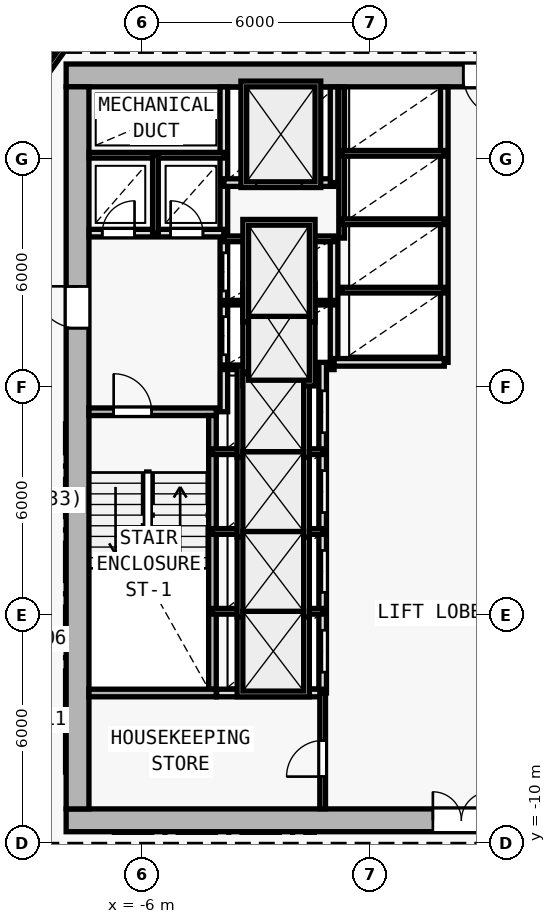
"""IFC4 building model, lengths in metres.
Left out: names, types, materials, properties, quantities, classifications, styles, units other than length and angle.
Written with IfcOpenShell. Run it as: python <this file> out.ifc"""

import sys

from ifc_helpers import new_model, si_unit, direction, frame, frame_2d, origin, origin_2d, place, context, subcontext, project, spatial, rectangle, i_section, extrude, element, fill, save


model = new_model("IFC4")
c1 = context("Model", 3, precision=1e-05, world=origin(), true_north=direction((0.0, 1.0)))
c2 = subcontext(c1, "Body", "Model", "MODEL_VIEW")
j1 = project(units=[si_unit("LENGTHUNIT", "METRE"), si_unit("PLANEANGLEUNIT", "RADIAN")], contexts=[c1])
p1 = place(None, origin())
s1 = spatial("IfcSite", under=j1, at=p1, CompositionType="ELEMENT")
p2 = place(p1, origin())
s2 = spatial("IfcBuilding", under=s1, at=p2, CompositionType="ELEMENT")
p3 = place(p2, frame((0.0, 0.0, 122.1)))
s3 = spatial("IfcBuildingStorey", under=s2, at=p3, CompositionType="ELEMENT", Elevation=122.1)
for number, where, z_axis, x_axis in (
    (1, (-7.7, -9.4, 0.0), (0.0, 0.0, 1.0), (1.0, 0.0, 0.0)),
    (2, (-7.7, 10.2, 0.0), (0.0, 0.0, 1.0), (1.0, 0.0, 0.0)),
    (3, (0.0, -9.4, 0.0), (0.0, 0.0, 1.0), (1.0, 0.0, 0.0)),
    (4, (-7.7, 2.0, 0.0), (0.0, 0.0, 1.0), (1.0, 0.0, 0.0)),
):
    element("IfcColumn", number, at=place(p3, frame(where, z_axis=z_axis, x_axis=x_axis)), inside=s3, PredefinedType="COLUMN", context=c2, shape_type="SweptSolid", body=[
        extrude(i_section(OverallWidth=0.409, OverallDepth=0.425, WebThickness=0.021, FlangeThickness=0.034, FilletRadius=0.015, at=origin_2d()), origin(), (0.0, 0.0, 1.0), 3.6),
    ])
p4 = place(p3, frame((-8.0, -9.4, 0.0), z_axis=(0.0, 0.0, 1.0), x_axis=(1.0, 0.0, 0.0)))
e5 = element("IfcWall", 5, at=p4, inside=s3, PredefinedType="SHEAR", context=c2, shape_type="SweptSolid", body=[
    extrude(rectangle(XDim=16.0, YDim=0.6, at=frame_2d((8.0, 0.0))), origin(), (0.0, 0.0, 1.0), 3.35),
])
p5 = place(p4, frame((9.65, 0.0, 0.0)))
e6 = element("IfcOpeningElement", 6, at=p5, cuts=e5, PredefinedType="OPENING", context=c2, shape_type="SweptSolid", body=[
    extrude(rectangle(XDim=1.5, YDim=2.2, at=frame_2d((0.75, 1.1))), frame((0.0, 0.31, 0.0), z_axis=(0.0, -1.0, 0.0), x_axis=(1.0, 0.0, 0.0)), (0.0, 0.0, 1.0), 0.62),
])
p6 = place(p3, frame((8.0, 10.2, 0.0), z_axis=(0.0, 0.0, 1.0), x_axis=(-1.0, 0.0, 0.0)))
e7 = element("IfcWall", 7, at=p6, inside=s3, PredefinedType="SHEAR", context=c2, shape_type="SweptSolid", body=[
    extrude(rectangle(XDim=16.0, YDim=0.6, at=frame_2d((8.0, 0.0))), origin(), (0.0, 0.0, 1.0), 3.35),
])
p7 = place(p6, frame((4.45, 0.0, 0.0)))
e8 = element("IfcOpeningElement", 8, at=p7, cuts=e7, PredefinedType="OPENING", context=c2, shape_type="SweptSolid", body=[
    extrude(rectangle(XDim=1.1, YDim=2.15, at=frame_2d((0.55, 1.075))), frame((0.0, 0.31, 0.0), z_axis=(0.0, -1.0, 0.0), x_axis=(1.0, 0.0, 0.0)), (0.0, 0.0, 1.0), 0.62),
])
p8 = place(p3, frame((-7.7, -9.1, 0.0), z_axis=(0.0, 0.0, 1.0), x_axis=(0.0, 1.0, 0.0)))
e9 = element("IfcWall", 9, at=p8, inside=s3, PredefinedType="SHEAR", context=c2, shape_type="SweptSolid", body=[
    extrude(rectangle(XDim=19.0, YDim=0.6, at=frame_2d((9.5, 0.0))), origin(), (0.0, 0.0, 1.0), 3.35),
])
p9 = place(p8, frame((12.65, 0.0, 0.0)))
e10 = element("IfcOpeningElement", 10, at=p9, cuts=e9, PredefinedType="OPENING", context=c2, shape_type="SweptSolid", body=[
    extrude(rectangle(XDim=1.1, YDim=2.15, at=frame_2d((0.55, 1.075))), frame((0.0, 0.31, 0.0), z_axis=(0.0, -1.0, 0.0), x_axis=(1.0, 0.0, 0.0)), (0.0, 0.0, 1.0), 0.62),
])
p10 = place(p3, frame((-7.4, 1.35, 0.0), z_axis=(0.0, 0.0, 1.0), x_axis=(1.0, 0.0, 0.0)))
e11 = element("IfcWall", 11, at=p10, inside=s3, PredefinedType="SOLIDWALL", context=c2, shape_type="SweptSolid", body=[
    extrude(rectangle(XDim=3.35, YDim=0.2, at=frame_2d((1.675, 0.0))), origin(), (0.0, 0.0, 1.0), 3.35),
])
p11 = place(p10, frame((0.65, 0.0, 0.0)))
e12 = element("IfcOpeningElement", 12, at=p11, cuts=e11, PredefinedType="OPENING", context=c2, shape_type="SweptSolid", body=[
    extrude(rectangle(XDim=1.0, YDim=2.15, at=frame_2d((0.5, 1.075))), frame((0.0, 0.11, 0.0), z_axis=(0.0, -1.0, 0.0), x_axis=(1.0, 0.0, 0.0)), (0.0, 0.0, 1.0), 0.22),
])
p12 = place(p3, frame((-4.15, -5.95, 0.0), z_axis=(0.0, 0.0, 1.0), x_axis=(0.0, 1.0, 0.0)))
e13 = element("IfcWall", 13, at=p12, inside=s3, PredefinedType="SOLIDWALL", context=c2, shape_type="SweptSolid", body=[
    extrude(rectangle(XDim=7.2, YDim=0.2, at=frame_2d((3.6, 0.0))), origin(), (0.0, 0.0, 1.0), 3.35),
])
p13 = place(p3, frame((-3.85, 1.35, 0.0), z_axis=(0.0, 0.0, 1.0), x_axis=(0.0, 1.0, 0.0)))
e14 = element("IfcWall", 14, at=p13, inside=s3, PredefinedType="SOLIDWALL", context=c2, shape_type="SweptSolid", body=[
    extrude(rectangle(XDim=8.545, YDim=0.2, at=frame_2d((4.272, 0.0))), origin(), (0.0, 0.0, 1.0), 3.35),
])
p14 = place(p13, frame((1.5, 0.0, 0.0)))
e15 = element("IfcOpeningElement", 15, at=p14, cuts=e14, PredefinedType="OPENING", context=c2, shape_type="SweptSolid", body=[
    extrude(rectangle(XDim=1.0, YDim=2.15, at=frame_2d((0.5, 1.075))), frame((0.0, 0.11, 0.0), z_axis=(0.0, -1.0, 0.0), x_axis=(1.0, 0.0, 0.0)), (0.0, 0.0, 1.0), 0.22),
])
p15 = place(p13, frame((3.18, 0.0, 0.0)))
e16 = element("IfcOpeningElement", 16, at=p15, cuts=e14, PredefinedType="OPENING", context=c2, shape_type="SweptSolid", body=[
    extrude(rectangle(XDim=1.0, YDim=2.15, at=frame_2d((0.5, 1.075))), frame((0.0, 0.11, 0.0), z_axis=(0.0, -1.0, 0.0), x_axis=(1.0, 0.0, 0.0)), (0.0, 0.0, 1.0), 0.22),
])
p16 = place(p3, frame((-7.395, 6.05, 0.0), z_axis=(0.0, 0.0, 1.0), x_axis=(1.0, 0.0, 0.0)))
e17 = element("IfcWall", 17, at=p16, inside=s3, PredefinedType="SOLIDWALL", context=c2, shape_type="SweptSolid", body=[
    extrude(rectangle(XDim=3.545, YDim=0.2, at=frame_2d((1.772, 0.0))), origin(), (0.0, 0.0, 1.0), 3.35),
])
p17 = place(p16, frame((0.345, 0.0, 0.0)))
e18 = element("IfcOpeningElement", 18, at=p17, cuts=e17, PredefinedType="OPENING", context=c2, shape_type="SweptSolid", body=[
    extrude(rectangle(XDim=0.85, YDim=2.1, at=frame_2d((0.425, 1.05))), frame((0.0, 0.11, 0.0), z_axis=(0.0, -1.0, 0.0), x_axis=(1.0, 0.0, 0.0)), (0.0, 0.0, 1.0), 0.22),
])
p18 = place(p16, frame((2.145, 0.0, 0.0)))
e19 = element("IfcOpeningElement", 19, at=p18, cuts=e17, PredefinedType="OPENING", context=c2, shape_type="SweptSolid", body=[
    extrude(rectangle(XDim=0.85, YDim=2.1, at=frame_2d((0.425, 1.05))), frame((0.0, 0.11, 0.0), z_axis=(0.0, -1.0, 0.0), x_axis=(1.0, 0.0, 0.0)), (0.0, 0.0, 1.0), 0.22),
])
p19 = place(p3, frame((-7.395, 8.1, 0.0), z_axis=(0.0, 0.0, 1.0), x_axis=(1.0, 0.0, 0.0)))
e20 = element("IfcWall", 20, at=p19, inside=s3, PredefinedType="PARTITIONING", context=c2, shape_type="SweptSolid", body=[
    extrude(rectangle(XDim=3.545, YDim=0.15, at=frame_2d((1.772, 0.0))), origin(), (0.0, 0.0, 1.0), 3.35),
])
p20 = place(p3, frame((-5.65, 6.05, 0.0), z_axis=(0.0, 0.0, 1.0), x_axis=(0.0, 1.0, 0.0)))
e21 = element("IfcWall", 21, at=p20, inside=s3, PredefinedType="PARTITIONING", context=c2, shape_type="SweptSolid", body=[
    extrude(rectangle(XDim=2.05, YDim=0.15, at=frame_2d((1.025, 0.0))), origin(), (0.0, 0.0, 1.0), 3.35),
])
p21 = place(p3, frame((-0.95, 2.65, 0.0), z_axis=(0.0, 0.0, 1.0), x_axis=(0.0, 1.0, 0.0)))
e22 = element("IfcWall", 22, at=p21, inside=s3, PredefinedType="SOLIDWALL", context=c2, shape_type="SweptSolid", body=[
    extrude(rectangle(XDim=3.27, YDim=0.2, at=frame_2d((1.635, 0.0))), origin(), (0.0, 0.0, 1.0), 3.35),
])
for number, where, z_axis, x_axis in (
    (23, (-3.85, 2.52, 0.0), (0.0, 0.0, 1.0), (1.0, 0.0, 0.0)),
    (24, (-3.85, 4.22, 0.0), (0.0, 0.0, 1.0), (1.0, 0.0, 0.0)),
):
    element("IfcWall", number, at=place(p3, frame(where, z_axis=z_axis, x_axis=x_axis)), inside=s3, PredefinedType="PARTITIONING", context=c2, shape_type="SweptSolid", body=[
        extrude(rectangle(XDim=2.9, YDim=0.12, at=frame_2d((1.45, 0.0))), origin(), (0.0, 0.0, 1.0), 3.35),
    ])
p22 = place(p3, frame((-3.85, 5.9, 0.0), z_axis=(0.0, 0.0, 1.0), x_axis=(1.0, 0.0, 0.0)))
e25 = element("IfcWall", 25, at=p22, inside=s3, PredefinedType="PARTITIONING", context=c2, shape_type="SweptSolid", body=[
    extrude(rectangle(XDim=2.9, YDim=0.15, at=frame_2d((1.45, 0.0))), origin(), (0.0, 0.0, 1.0), 3.35),
])
p23 = place(p3, frame((-3.85, 7.38, 0.0), z_axis=(0.0, 0.0, 1.0), x_axis=(1.0, 0.0, 0.0)))
e26 = element("IfcWall", 26, at=p23, inside=s3, PredefinedType="SOLIDWALL", context=c2, shape_type="SweptSolid", body=[
    extrude(rectangle(XDim=2.9, YDim=0.2, at=frame_2d((1.45, 0.0))), origin(), (0.0, 0.0, 1.0), 3.35),
])
p24 = place(p23, frame((0.85, 0.0, 0.0)))
e27 = element("IfcOpeningElement", 27, at=p24, cuts=e26, PredefinedType="OPENING", context=c2, shape_type="SweptSolid", body=[
    extrude(rectangle(XDim=1.2, YDim=2.2, at=frame_2d((0.6, 1.1))), frame((0.0, 0.11, 0.0), z_axis=(0.0, -1.0, 0.0), x_axis=(1.0, 0.0, 0.0)), (0.0, 0.0, 1.0), 0.22),
])
p25 = place(p3, frame((-0.95, 7.38, 0.0), z_axis=(0.0, 0.0, 1.0), x_axis=(0.0, 1.0, 0.0)))
e28 = element("IfcWall", 28, at=p25, inside=s3, PredefinedType="SOLIDWALL", context=c2, shape_type="SweptSolid", body=[
    extrude(rectangle(XDim=2.515, YDim=0.2, at=frame_2d((1.258, 0.0))), origin(), (0.0, 0.0, 1.0), 3.35),
])
p26 = place(p3, frame((-1.25, -6.05, 0.0), z_axis=(0.0, 0.0, 1.0), x_axis=(0.0, 1.0, 0.0)))
e29 = element("IfcWall", 29, at=p26, inside=s3, PredefinedType="SOLIDWALL", context=c2, shape_type="SweptSolid", body=[
    extrude(rectangle(XDim=8.7, YDim=0.2, at=frame_2d((4.35, 0.0))), origin(), (0.0, 0.0, 1.0), 3.35),
])
p27 = place(p26, frame((0.55, 0.0, 0.0)))
e30 = element("IfcOpeningElement", 30, at=p27, cuts=e29, PredefinedType="OPENING", context=c2, shape_type="SweptSolid", body=[
    extrude(rectangle(XDim=1.1, YDim=2.15, at=frame_2d((0.55, 1.075))), frame((0.0, 0.11, 0.0), z_axis=(0.0, -1.0, 0.0), x_axis=(1.0, 0.0, 0.0)), (0.0, 0.0, 1.0), 0.22),
])
p28 = place(p26, frame((2.65, 0.0, 0.0)))
e31 = element("IfcOpeningElement", 31, at=p28, cuts=e29, PredefinedType="OPENING", context=c2, shape_type="SweptSolid", body=[
    extrude(rectangle(XDim=1.1, YDim=2.15, at=frame_2d((0.55, 1.075))), frame((0.0, 0.11, 0.0), z_axis=(0.0, -1.0, 0.0), x_axis=(1.0, 0.0, 0.0)), (0.0, 0.0, 1.0), 0.22),
])
p29 = place(p26, frame((4.75, 0.0, 0.0)))
e32 = element("IfcOpeningElement", 32, at=p29, cuts=e29, PredefinedType="OPENING", context=c2, shape_type="SweptSolid", body=[
    extrude(rectangle(XDim=1.1, YDim=2.15, at=frame_2d((0.55, 1.075))), frame((0.0, 0.11, 0.0), z_axis=(0.0, -1.0, 0.0), x_axis=(1.0, 0.0, 0.0)), (0.0, 0.0, 1.0), 0.22),
])
p30 = place(p26, frame((6.85, 0.0, 0.0)))
e33 = element("IfcOpeningElement", 33, at=p30, cuts=e29, PredefinedType="OPENING", context=c2, shape_type="SweptSolid", body=[
    extrude(rectangle(XDim=1.1, YDim=2.15, at=frame_2d((0.55, 1.075))), frame((0.0, 0.11, 0.0), z_axis=(0.0, -1.0, 0.0), x_axis=(1.0, 0.0, 0.0)), (0.0, 0.0, 1.0), 0.22),
])
for number, where, z_axis, x_axis in (
    (34, (-4.15, -3.9, 0.0), (0.0, 0.0, 1.0), (1.0, 0.0, 0.0)),
    (35, (-4.15, -1.8, 0.0), (0.0, 0.0, 1.0), (1.0, 0.0, 0.0)),
    (36, (-4.15, 0.3, 0.0), (0.0, 0.0, 1.0), (1.0, 0.0, 0.0)),
):
    element("IfcWall", number, at=place(p3, frame(where, z_axis=z_axis, x_axis=x_axis)), inside=s3, PredefinedType="PARTITIONING", context=c2, shape_type="SweptSolid", body=[
        extrude(rectangle(XDim=2.9, YDim=0.15, at=frame_2d((1.45, 0.0))), origin(), (0.0, 0.0, 1.0), 3.35),
    ])
p31 = place(p3, frame((1.95, 2.65, 0.0), z_axis=(0.0, 0.0, 1.0), x_axis=(0.0, 1.0, 0.0)))
e37 = element("IfcWall", 37, at=p31, inside=s3, PredefinedType="SOLIDWALL", context=c2, shape_type="SweptSolid", body=[
    extrude(rectangle(XDim=7.245, YDim=0.2, at=frame_2d((3.623, 0.0))), origin(), (0.0, 0.0, 1.0), 3.35),
])
p32 = place(p3, frame((-0.95, 2.65, 0.0), z_axis=(0.0, 0.0, 1.0), x_axis=(1.0, 0.0, 0.0)))
e38 = element("IfcWall", 38, at=p32, inside=s3, PredefinedType="SOLIDWALL", context=c2, shape_type="SweptSolid", body=[
    extrude(rectangle(XDim=2.9, YDim=0.2, at=frame_2d((1.45, 0.0))), origin(), (0.0, 0.0, 1.0), 3.35),
])
p33 = place(p3, frame((-0.75, 5.92, 0.0), z_axis=(0.0, 0.0, 1.0), x_axis=(0.0, 1.0, 0.0)))
e39 = element("IfcWall", 39, at=p33, inside=s3, PredefinedType="PARTITIONING", context=c2, shape_type="SweptSolid", body=[
    extrude(rectangle(XDim=3.975, YDim=0.15, at=frame_2d((1.988, 0.0))), origin(), (0.0, 0.0, 1.0), 3.35),
])
for number, where, z_axis, x_axis in (
    (40, (-0.75, 4.55, 0.0), (0.0, 0.0, 1.0), (1.0, 0.0, 0.0)),
    (41, (-0.75, 6.35, 0.0), (0.0, 0.0, 1.0), (1.0, 0.0, 0.0)),
    (42, (-0.75, 8.15, 0.0), (0.0, 0.0, 1.0), (1.0, 0.0, 0.0)),
):
    element("IfcWall", number, at=place(p3, frame(where, z_axis=z_axis, x_axis=x_axis)), inside=s3, PredefinedType="PARTITIONING", context=c2, shape_type="SweptSolid", body=[
        extrude(rectangle(XDim=2.7, YDim=0.15, at=frame_2d((1.35, 0.0))), origin(), (0.0, 0.0, 1.0), 3.35),
    ])
p34 = place(p3, frame((-7.4, -6.05, 0.0), z_axis=(0.0, 0.0, 1.0), x_axis=(1.0, 0.0, 0.0)))
e43 = element("IfcWall", 43, at=p34, inside=s3, PredefinedType="SOLIDWALL", context=c2, shape_type="SweptSolid", body=[
    extrude(rectangle(XDim=3.35, YDim=0.2, at=frame_2d((1.675, 0.0))), origin(), (0.0, 0.0, 1.0), 3.35),
])
p35 = place(p3, frame((-4.04, -6.05, 0.0), z_axis=(0.0, 0.0, 1.0), x_axis=(1.0, 0.0, 0.0)))
e44 = element("IfcWall", 44, at=p35, inside=s3, PredefinedType="SOLIDWALL", context=c2, shape_type="SweptSolid", body=[
    extrude(rectangle(XDim=2.79, YDim=0.2, at=frame_2d((1.395, 0.0))), origin(), (0.0, 0.0, 1.0), 3.35),
])
p36 = place(p3, frame((-1.25, -9.095, 0.0), z_axis=(0.0, 0.0, 1.0), x_axis=(0.0, 1.0, 0.0)))
e45 = element("IfcWall", 45, at=p36, inside=s3, PredefinedType="PARTITIONING", context=c2, shape_type="SweptSolid", body=[
    extrude(rectangle(XDim=3.045, YDim=0.15, at=frame_2d((1.522, 0.0))), origin(), (0.0, 0.0, 1.0), 3.35),
])
p37 = place(p36, frame((0.845, 0.0, 0.0)))
e46 = element("IfcOpeningElement", 46, at=p37, cuts=e45, PredefinedType="OPENING", context=c2, shape_type="SweptSolid", body=[
    extrude(rectangle(XDim=0.95, YDim=2.1, at=frame_2d((0.475, 1.05))), frame((0.0, 0.085, 0.0), z_axis=(0.0, -1.0, 0.0), x_axis=(1.0, 0.0, 0.0)), (0.0, 0.0, 1.0), 0.17),
])
p38 = place(p3, frame((-9.86, 8.426, 0.0), z_axis=(0.0, 0.0, 1.0), x_axis=(0.582449511476, 0.812866881218, 0.0)))
e47 = element("IfcWall", 47, at=p38, inside=s3, PredefinedType="PARTITIONING", context=c2, shape_type="SweptSolid", body=[
    extrude(rectangle(XDim=4.84, YDim=0.15, at=frame_2d((2.42, 0.0))), origin(), (0.0, 0.0, 1.0), 2.965),
])
p39 = place(p5, origin())
e48 = element("IfcDoor", 48, at=p39, inside=s3, OperationType="DOUBLE_DOOR_SINGLE_SWING", PredefinedType="DOOR", context=c2, shape_type="SweptSolid", body=[
    extrude(rectangle(XDim=1.5, YDim=2.2, at=frame_2d((0.75, 1.1))), frame((0.0, 0.025, 0.0), z_axis=(0.0, -1.0, 0.0), x_axis=(1.0, 0.0, 0.0)), (0.0, 0.0, 1.0), 0.05),
])
fill(e6, e48)
p40 = place(p9, origin())
e49 = element("IfcDoor", 49, at=p40, inside=s3, OperationType="SINGLE_SWING_RIGHT", PredefinedType="DOOR", context=c2, shape_type="SweptSolid", body=[
    extrude(rectangle(XDim=1.1, YDim=2.15, at=frame_2d((0.55, 1.075))), frame((0.0, 0.025, 0.0), z_axis=(0.0, -1.0, 0.0), x_axis=(1.0, 0.0, 0.0)), (0.0, 0.0, 1.0), 0.05),
])
fill(e10, e49)
p41 = place(p7, origin())
e50 = element("IfcDoor", 50, at=p41, inside=s3, OperationType="SINGLE_SWING_LEFT", PredefinedType="DOOR", context=c2, shape_type="SweptSolid", body=[
    extrude(rectangle(XDim=1.1, YDim=2.15, at=frame_2d((0.55, 1.075))), frame((0.0, 0.025, 0.0), z_axis=(0.0, -1.0, 0.0), x_axis=(1.0, 0.0, 0.0)), (0.0, 0.0, 1.0), 0.05),
])
fill(e8, e50)
p42 = place(p11, origin())
e51 = element("IfcDoor", 51, at=p42, inside=s3, OperationType="SINGLE_SWING_LEFT", PredefinedType="DOOR", context=c2, shape_type="SweptSolid", body=[
    extrude(rectangle(XDim=1.0, YDim=2.15, at=frame_2d((0.5, 1.075))), frame((0.0, 0.025, 0.0), z_axis=(0.0, -1.0, 0.0), x_axis=(1.0, 0.0, 0.0)), (0.0, 0.0, 1.0), 0.05),
])
fill(e12, e51)
p43 = place(p17, origin())
e52 = element("IfcDoor", 52, at=p43, inside=s3, OperationType="SINGLE_SWING_RIGHT", PredefinedType="DOOR", context=c2, shape_type="SweptSolid", body=[
    extrude(rectangle(XDim=0.85, YDim=2.1, at=frame_2d((0.425, 1.05))), frame((0.0, 0.025, 0.0), z_axis=(0.0, -1.0, 0.0), x_axis=(1.0, 0.0, 0.0)), (0.0, 0.0, 1.0), 0.05),
])
fill(e18, e52)
p44 = place(p18, origin())
e53 = element("IfcDoor", 53, at=p44, inside=s3, OperationType="SINGLE_SWING_LEFT", PredefinedType="DOOR", context=c2, shape_type="SweptSolid", body=[
    extrude(rectangle(XDim=0.85, YDim=2.1, at=frame_2d((0.425, 1.05))), frame((0.0, 0.025, 0.0), z_axis=(0.0, -1.0, 0.0), x_axis=(1.0, 0.0, 0.0)), (0.0, 0.0, 1.0), 0.05),
])
fill(e19, e53)
p45 = place(p24, origin())
e54 = element("IfcDoor", 54, at=p45, inside=s3, OperationType="DOUBLE_DOOR_SLIDING", PredefinedType="DOOR", context=c2, shape_type="SweptSolid", body=[
    extrude(rectangle(XDim=1.2, YDim=2.2, at=frame_2d((0.6, 1.1))), frame((0.0, 0.025, 0.0), z_axis=(0.0, -1.0, 0.0), x_axis=(1.0, 0.0, 0.0)), (0.0, 0.0, 1.0), 0.05),
])
fill(e27, e54)
p46 = place(p27, origin())
e55 = element("IfcDoor", 55, at=p46, inside=s3, OperationType="DOUBLE_DOOR_SLIDING", PredefinedType="DOOR", context=c2, shape_type="SweptSolid", body=[
    extrude(rectangle(XDim=1.1, YDim=2.15, at=frame_2d((0.55, 1.075))), frame((0.0, 0.025, 0.0), z_axis=(0.0, -1.0, 0.0), x_axis=(1.0, 0.0, 0.0)), (0.0, 0.0, 1.0), 0.05),
])
fill(e30, e55)
p47 = place(p28, origin())
e56 = element("IfcDoor", 56, at=p47, inside=s3, OperationType="DOUBLE_DOOR_SLIDING", PredefinedType="DOOR", context=c2, shape_type="SweptSolid", body=[
    extrude(rectangle(XDim=1.1, YDim=2.15, at=frame_2d((0.55, 1.075))), frame((0.0, 0.025, 0.0), z_axis=(0.0, -1.0, 0.0), x_axis=(1.0, 0.0, 0.0)), (0.0, 0.0, 1.0), 0.05),
])
fill(e31, e56)
p48 = place(p29, origin())
e57 = element("IfcDoor", 57, at=p48, inside=s3, OperationType="DOUBLE_DOOR_SLIDING", PredefinedType="DOOR", context=c2, shape_type="SweptSolid", body=[
    extrude(rectangle(XDim=1.1, YDim=2.15, at=frame_2d((0.55, 1.075))), frame((0.0, 0.025, 0.0), z_axis=(0.0, -1.0, 0.0), x_axis=(1.0, 0.0, 0.0)), (0.0, 0.0, 1.0), 0.05),
])
fill(e32, e57)
p49 = place(p30, origin())
e58 = element("IfcDoor", 58, at=p49, inside=s3, OperationType="DOUBLE_DOOR_SLIDING", PredefinedType="DOOR", context=c2, shape_type="SweptSolid", body=[
    extrude(rectangle(XDim=1.1, YDim=2.15, at=frame_2d((0.55, 1.075))), frame((0.0, 0.025, 0.0), z_axis=(0.0, -1.0, 0.0), x_axis=(1.0, 0.0, 0.0)), (0.0, 0.0, 1.0), 0.05),
])
fill(e33, e58)
p50 = place(p14, origin())
e59 = element("IfcDoor", 59, at=p50, inside=s3, OperationType="DOUBLE_DOOR_SLIDING", PredefinedType="DOOR", context=c2, shape_type="SweptSolid", body=[
    extrude(rectangle(XDim=1.0, YDim=2.15, at=frame_2d((0.5, 1.075))), frame((0.0, 0.025, 0.0), z_axis=(0.0, -1.0, 0.0), x_axis=(1.0, 0.0, 0.0)), (0.0, 0.0, 1.0), 0.05),
])
fill(e15, e59)
p51 = place(p15, origin())
e60 = element("IfcDoor", 60, at=p51, inside=s3, OperationType="DOUBLE_DOOR_SLIDING", PredefinedType="DOOR", context=c2, shape_type="SweptSolid", body=[
    extrude(rectangle(XDim=1.0, YDim=2.15, at=frame_2d((0.5, 1.075))), frame((0.0, 0.025, 0.0), z_axis=(0.0, -1.0, 0.0), x_axis=(1.0, 0.0, 0.0)), (0.0, 0.0, 1.0), 0.05),
])
fill(e16, e60)
p52 = place(p37, origin())
e61 = element("IfcDoor", 61, at=p52, inside=s3, OperationType="SINGLE_SWING_LEFT", PredefinedType="DOOR", context=c2, shape_type="SweptSolid", body=[
    extrude(rectangle(XDim=0.95, YDim=2.1, at=frame_2d((0.475, 1.05))), frame((0.0, 0.025, 0.0), z_axis=(0.0, -1.0, 0.0), x_axis=(1.0, 0.0, 0.0)), (0.0, 0.0, 1.0), 0.05),
])
fill(e46, e61)
save(model, sys.argv[1])
